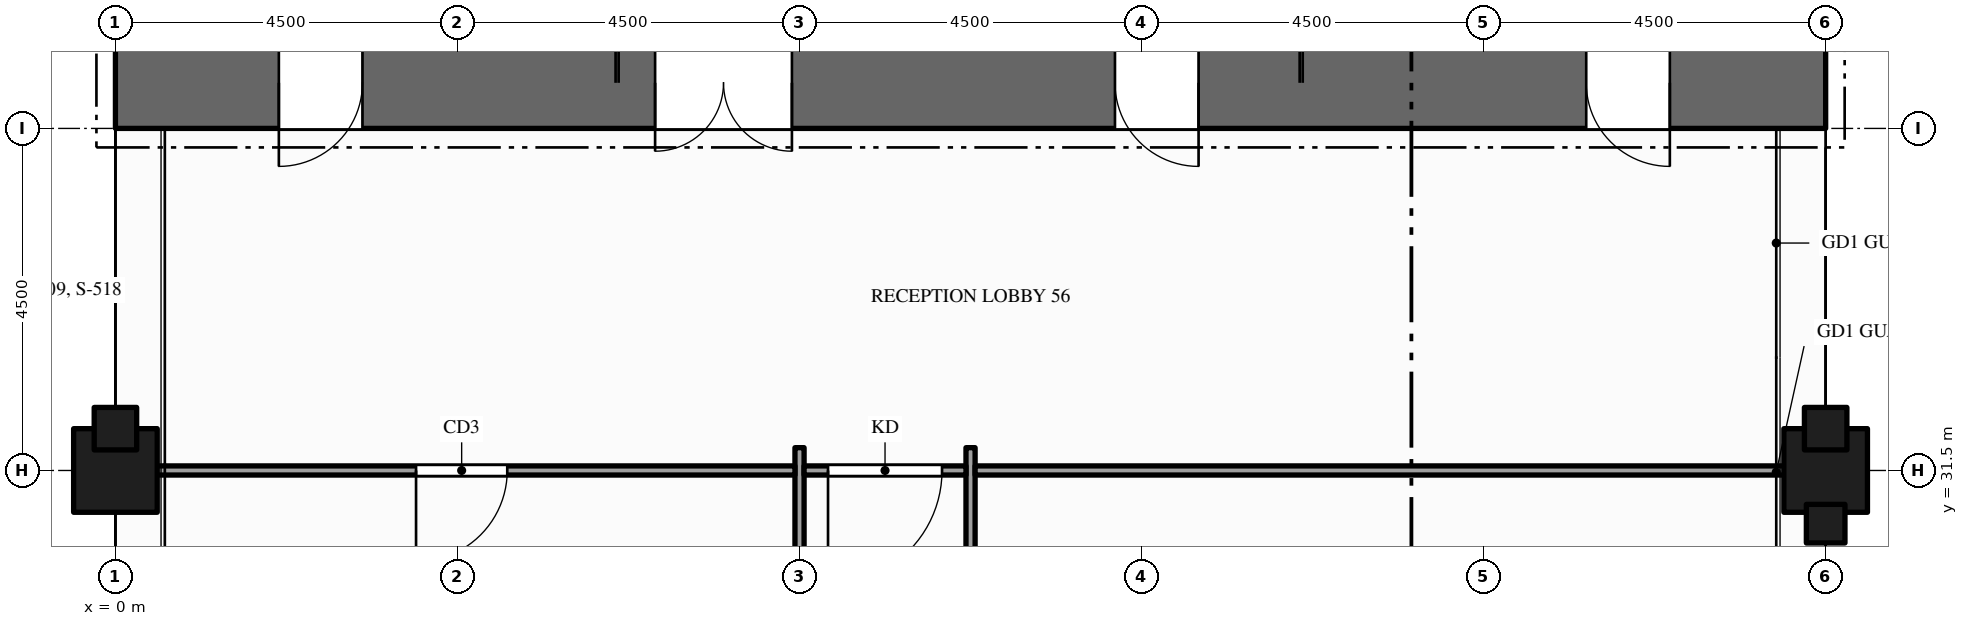
"""IFC4 building model, lengths in metres.
Left out: names, types, materials, properties, quantities, classifications, styles, units other than length and angle.
Written with IfcOpenShell. Run it as: python <this file> out.ifc"""

import sys

from ifc_helpers import new_model, si_unit, direction, frame, frame_2d, origin, origin_2d, place, context, subcontext, project, spatial, rectangle, hollow_rectangle, extrude, element, fill, save


model = new_model("IFC4")
c1 = context("Model", 3, precision=1e-05, world=origin(), true_north=direction((0.0, 1.0)))
c2 = subcontext(c1, "Body", "Model", "MODEL_VIEW")
j1 = project(units=[si_unit("LENGTHUNIT", "METRE"), si_unit("PLANEANGLEUNIT", "RADIAN")], contexts=[c1])
p1 = place(None, origin())
s1 = spatial("IfcSite", under=j1, at=p1, CompositionType="ELEMENT")
p2 = place(p1, origin())
s2 = spatial("IfcBuilding", under=s1, at=p2, CompositionType="ELEMENT")
p3 = place(p2, frame((0.0, 0.0, 77.0)))
s3 = spatial("IfcBuildingStorey", under=s2, at=p3, CompositionType="ELEMENT", Elevation=77.0)
p4 = place(p3, frame((0.0, 36.6, -0.15), z_axis=(0.0, 0.0, 1.0), x_axis=(1.0, 0.0, 0.0)))
e1 = element("IfcWall", 1, at=p4, inside=s3, PredefinedType="SHEAR", context=c2, shape_type="SweptSolid", body=[
    extrude(rectangle(XDim=22.5, YDim=1.2, at=frame_2d((11.25, 0.0))), origin(), (0.0, 0.0, 1.0), 6.0),
])
p5 = place(p4, frame((7.1, 0.0, 0.15)))
e2 = element("IfcOpeningElement", 2, at=p5, cuts=e1, PredefinedType="OPENING", context=c2, shape_type="SweptSolid", body=[
    extrude(rectangle(XDim=1.8, YDim=2.1, at=frame_2d((0.9, 1.05))), frame((0.0, 0.61, 0.0), z_axis=(0.0, -1.0, 0.0), x_axis=(1.0, 0.0, 0.0)), (0.0, 0.0, 1.0), 1.22),
])
p6 = place(p4, frame((13.15, 0.0, 0.15)))
e3 = element("IfcOpeningElement", 3, at=p6, cuts=e1, PredefinedType="OPENING", context=c2, shape_type="SweptSolid", body=[
    extrude(rectangle(XDim=1.1, YDim=2.1, at=frame_2d((0.55, 1.05))), frame((0.0, 0.61, 0.0), z_axis=(0.0, -1.0, 0.0), x_axis=(1.0, 0.0, 0.0)), (0.0, 0.0, 1.0), 1.22),
])
p7 = place(p4, frame((2.15, 0.0, 0.15)))
e4 = element("IfcOpeningElement", 4, at=p7, cuts=e1, PredefinedType="OPENING", context=c2, shape_type="SweptSolid", body=[
    extrude(rectangle(XDim=1.1, YDim=2.1, at=frame_2d((0.55, 1.05))), frame((0.0, 0.61, 0.0), z_axis=(0.0, -1.0, 0.0), x_axis=(1.0, 0.0, 0.0)), (0.0, 0.0, 1.0), 1.22),
])
p8 = place(p4, frame((19.35, 0.0, 0.15)))
e5 = element("IfcOpeningElement", 5, at=p8, cuts=e1, PredefinedType="OPENING", context=c2, shape_type="SweptSolid", body=[
    extrude(rectangle(XDim=1.1, YDim=2.1, at=frame_2d((0.55, 1.05))), frame((0.0, 0.61, 0.0), z_axis=(0.0, -1.0, 0.0), x_axis=(1.0, 0.0, 0.0)), (0.0, 0.0, 1.0), 1.22),
])
for number, where, z_axis, x_axis in (
    (6, (0.0, 31.5, -0.25), (0.0, 0.0, 1.0), (1.0, 0.0, 0.0)),
    (7, (22.5, 31.5, -0.25), (0.0, 0.0, 1.0), (1.0, 0.0, 0.0)),
):
    element("IfcColumn", number, at=place(p3, frame(where, z_axis=z_axis, x_axis=x_axis)), inside=s3, PredefinedType="COLUMN", context=c2, shape_type="SweptSolid", body=[
        extrude(hollow_rectangle(XDim=1.1, YDim=1.1, WallThickness=0.06, at=origin_2d()), origin(), (0.0, 0.0, 1.0), 6.1),
    ])
p9 = place(p3, frame((9.0, 10.95, 0.0), z_axis=(0.0, 0.0, 1.0), x_axis=(0.0, 1.0, 0.0)))
e8 = element("IfcWall", 8, at=p9, inside=s3, PredefinedType="PARTITIONING", context=c2, shape_type="SweptSolid", body=[
    extrude(rectangle(XDim=20.85, YDim=0.12, at=frame_2d((10.425, 0.0))), origin(), (0.0, 0.0, 1.0), 4.6),
])
p10 = place(p9, frame((2.05, 0.0, 0.0)))
e9 = element("IfcOpeningElement", 9, at=p10, cuts=e8, PredefinedType="OPENING", context=c2, shape_type="SweptSolid", body=[
    extrude(rectangle(XDim=1.0, YDim=2.1, at=frame_2d((0.5, 1.05))), frame((0.0, 0.07, 0.0), z_axis=(0.0, -1.0, 0.0), x_axis=(1.0, 0.0, 0.0)), (0.0, 0.0, 1.0), 0.14),
])
p11 = place(p9, frame((6.45, 0.0, 0.0)))
e10 = element("IfcOpeningElement", 10, at=p11, cuts=e8, PredefinedType="OPENING", context=c2, shape_type="SweptSolid", body=[
    extrude(rectangle(XDim=1.2, YDim=2.1, at=frame_2d((0.6, 1.05))), frame((0.0, 0.07, 0.0), z_axis=(0.0, -1.0, 0.0), x_axis=(1.0, 0.0, 0.0)), (0.0, 0.0, 1.0), 0.14),
])
p12 = place(p9, frame((12.175, 0.0, 0.0)))
e11 = element("IfcOpeningElement", 11, at=p12, cuts=e8, PredefinedType="OPENING", context=c2, shape_type="SweptSolid", body=[
    extrude(rectangle(XDim=1.0, YDim=2.1, at=frame_2d((0.5, 1.05))), frame((0.0, 0.07, 0.0), z_axis=(0.0, -1.0, 0.0), x_axis=(1.0, 0.0, 0.0)), (0.0, 0.0, 1.0), 0.14),
])
p13 = place(p3, frame((11.25, 10.95, 0.0), z_axis=(0.0, 0.0, 1.0), x_axis=(0.0, 1.0, 0.0)))
e12 = element("IfcWall", 12, at=p13, inside=s3, PredefinedType="PARTITIONING", context=c2, shape_type="SweptSolid", body=[
    extrude(rectangle(XDim=20.85, YDim=0.12, at=frame_2d((10.425, 0.0))), origin(), (0.0, 0.0, 1.0), 4.6),
])
p14 = place(p13, frame((17.8, 0.0, 0.0)))
e13 = element("IfcOpeningElement", 13, at=p14, cuts=e12, PredefinedType="OPENING", context=c2, shape_type="SweptSolid", body=[
    extrude(rectangle(XDim=1.0, YDim=2.1, at=frame_2d((0.5, 1.05))), frame((0.0, 0.07, 0.0), z_axis=(0.0, -1.0, 0.0), x_axis=(1.0, 0.0, 0.0)), (0.0, 0.0, 1.0), 0.14),
])
p15 = place(p13, frame((4.2, 0.0, 0.0)))
e14 = element("IfcOpeningElement", 14, at=p15, cuts=e12, PredefinedType="OPENING", context=c2, shape_type="SweptSolid", body=[
    extrude(rectangle(XDim=1.2, YDim=2.1, at=frame_2d((0.6, 1.05))), frame((0.0, 0.07, 0.0), z_axis=(0.0, -1.0, 0.0), x_axis=(1.0, 0.0, 0.0)), (0.0, 0.0, 1.0), 0.14),
])
p16 = place(p3, frame((0.15, 31.5, 0.0), z_axis=(0.0, 0.0, 1.0), x_axis=(1.0, 0.0, 0.0)))
e15 = element("IfcWall", 15, at=p16, inside=s3, PredefinedType="PARTITIONING", context=c2, shape_type="SweptSolid", body=[
    extrude(rectangle(XDim=8.79, YDim=0.12, at=frame_2d((4.395, 0.0))), origin(), (0.0, 0.0, 1.0), 4.45),
])
p17 = place(p16, frame((3.805, 0.0, 0.0)))
e16 = element("IfcOpeningElement", 16, at=p17, cuts=e15, PredefinedType="OPENING", context=c2, shape_type="SweptSolid", body=[
    extrude(rectangle(XDim=1.2, YDim=2.1, at=frame_2d((0.6, 1.05))), frame((0.0, 0.07, 0.0), z_axis=(0.0, -1.0, 0.0), x_axis=(1.0, 0.0, 0.0)), (0.0, 0.0, 1.0), 0.14),
])
p18 = place(p3, frame((9.06, 31.5, 0.0), z_axis=(0.0, 0.0, 1.0), x_axis=(1.0, 0.0, 0.0)))
e17 = element("IfcWall", 17, at=p18, inside=s3, PredefinedType="PARTITIONING", context=c2, shape_type="SweptSolid", body=[
    extrude(rectangle(XDim=2.13, YDim=0.12, at=frame_2d((1.065, 0.0))), origin(), (0.0, 0.0, 1.0), 4.938),
])
p19 = place(p18, frame((0.315, 0.0, 0.0)))
e18 = element("IfcOpeningElement", 18, at=p19, cuts=e17, PredefinedType="OPENING", context=c2, shape_type="SweptSolid", body=[
    extrude(rectangle(XDim=1.5, YDim=2.1, at=frame_2d((0.75, 1.05))), frame((0.0, 0.07, 0.0), z_axis=(0.0, -1.0, 0.0), x_axis=(1.0, 0.0, 0.0)), (0.0, 0.0, 1.0), 0.14),
])
p20 = place(p3, frame((11.31, 31.5, 0.0), z_axis=(0.0, 0.0, 1.0), x_axis=(1.0, 0.0, 0.0)))
e19 = element("IfcWall", 19, at=p20, inside=s3, PredefinedType="PARTITIONING", context=c2, shape_type="SweptSolid", body=[
    extrude(rectangle(XDim=11.04, YDim=0.12, at=frame_2d((5.52, 0.0))), origin(), (0.0, 0.0, 1.0), 4.938),
])
p21 = place(p5, origin())
e20 = element("IfcDoor", 20, at=p21, inside=s3, OperationType="DOUBLE_DOOR_SINGLE_SWING", PredefinedType="DOOR", context=c2, shape_type="SweptSolid", body=[
    extrude(rectangle(XDim=1.8, YDim=2.1, at=frame_2d((0.9, 1.05))), frame((0.0, 0.025, 0.0), z_axis=(0.0, -1.0, 0.0), x_axis=(1.0, 0.0, 0.0)), (0.0, 0.0, 1.0), 0.05),
])
fill(e2, e20)
p22 = place(p6, origin())
e21 = element("IfcDoor", 21, at=p22, inside=s3, OperationType="SINGLE_SWING_RIGHT", PredefinedType="DOOR", context=c2, shape_type="SweptSolid", body=[
    extrude(rectangle(XDim=1.1, YDim=2.1, at=frame_2d((0.55, 1.05))), frame((0.0, 0.025, 0.0), z_axis=(0.0, -1.0, 0.0), x_axis=(1.0, 0.0, 0.0)), (0.0, 0.0, 1.0), 0.05),
])
fill(e3, e21)
p23 = place(p7, origin())
e22 = element("IfcDoor", 22, at=p23, inside=s3, OperationType="SINGLE_SWING_LEFT", PredefinedType="DOOR", context=c2, shape_type="SweptSolid", body=[
    extrude(rectangle(XDim=1.1, YDim=2.1, at=frame_2d((0.55, 1.05))), frame((0.0, 0.025, 0.0), z_axis=(0.0, -1.0, 0.0), x_axis=(1.0, 0.0, 0.0)), (0.0, 0.0, 1.0), 0.05),
])
fill(e4, e22)
p24 = place(p8, origin())
e23 = element("IfcDoor", 23, at=p24, inside=s3, OperationType="SINGLE_SWING_RIGHT", PredefinedType="DOOR", context=c2, shape_type="SweptSolid", body=[
    extrude(rectangle(XDim=1.1, YDim=2.1, at=frame_2d((0.55, 1.05))), frame((0.0, 0.025, 0.0), z_axis=(0.0, -1.0, 0.0), x_axis=(1.0, 0.0, 0.0)), (0.0, 0.0, 1.0), 0.05),
])
fill(e5, e23)
p25 = place(p19, origin())
e24 = element("IfcDoor", 24, at=p25, inside=s3, OperationType="SINGLE_SWING_LEFT", PredefinedType="DOOR", context=c2, shape_type="SweptSolid", body=[
    extrude(rectangle(XDim=1.5, YDim=2.1, at=frame_2d((0.75, 1.05))), frame((0.0, 0.025, 0.0), z_axis=(0.0, -1.0, 0.0), x_axis=(1.0, 0.0, 0.0)), (0.0, 0.0, 1.0), 0.05),
])
fill(e18, e24)
p26 = place(p17, origin())
e25 = element("IfcDoor", 25, at=p26, inside=s3, OperationType="SINGLE_SWING_LEFT", PredefinedType="DOOR", context=c2, shape_type="SweptSolid", body=[
    extrude(rectangle(XDim=1.2, YDim=2.1, at=frame_2d((0.6, 1.05))), frame((0.0, 0.025, 0.0), z_axis=(0.0, -1.0, 0.0), x_axis=(1.0, 0.0, 0.0)), (0.0, 0.0, 1.0), 0.05),
])
fill(e16, e25)
save(model, sys.argv[1])
